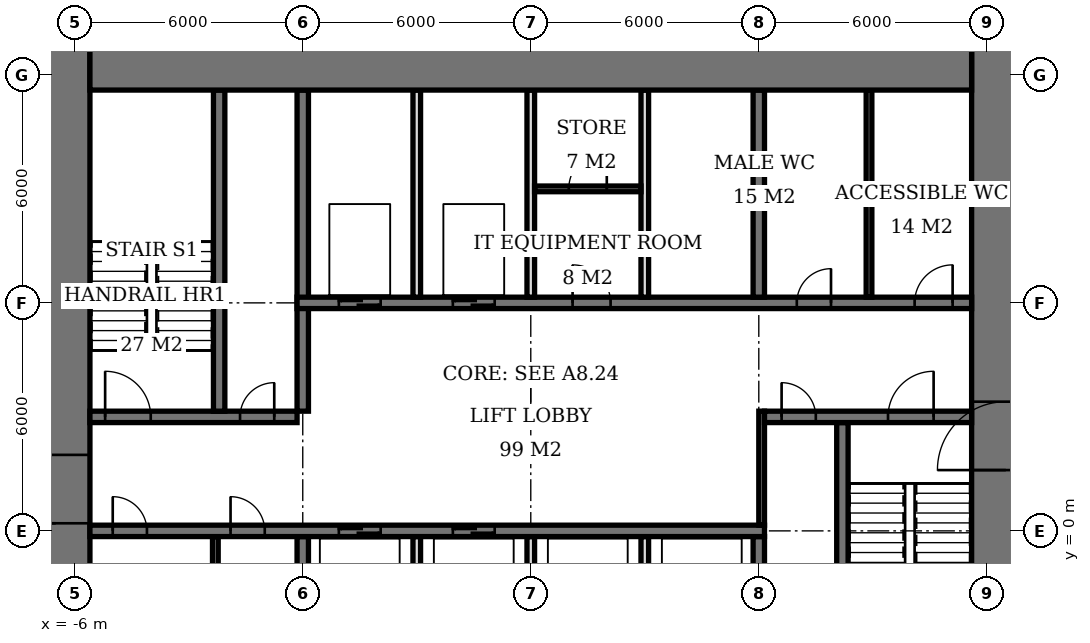
"""IFC4 building model, lengths in metres.
Left out: names, types, materials, properties, quantities, classifications, styles, units other than length and angle.
Written with IfcOpenShell. Run it as: python <this file> out.ifc"""

import sys

from ifc_helpers import new_model, si_unit, direction, frame, frame_2d, origin, place, context, subcontext, project, spatial, rectangle, extrude, element, fill, save


model = new_model("IFC4")
c1 = context("Model", 3, precision=1e-05, world=origin(), true_north=direction((0.0, 1.0)))
c2 = subcontext(c1, "Body", "Model", "MODEL_VIEW")
j1 = project(units=[si_unit("LENGTHUNIT", "METRE"), si_unit("PLANEANGLEUNIT", "RADIAN")], contexts=[c1])
p1 = place(None, origin())
s1 = spatial("IfcSite", under=j1, at=p1, CompositionType="ELEMENT")
p2 = place(p1, origin())
s2 = spatial("IfcBuilding", under=s1, at=p2, CompositionType="ELEMENT")
p3 = place(p2, frame((0.0, 0.0, 105.5)))
s3 = spatial("IfcBuildingStorey", under=s2, at=p3, CompositionType="ELEMENT", Elevation=105.5)
p4 = place(p3, frame((-5.6, 12.6, 0.0), z_axis=(0.0, 0.0, 1.0), x_axis=(1.0, 0.0, 0.0)))
e1 = element("IfcWall", 1, at=p4, inside=s3, PredefinedType="SHEAR", context=c2, shape_type="SweptSolid", body=[
    extrude(rectangle(XDim=23.2, YDim=2.0, at=frame_2d((11.6, 0.0))), origin(), (0.0, 0.0, 1.0), 3.9),
])
p5 = place(p3, frame((-6.5, -7.6, 0.0), z_axis=(0.0, 0.0, 1.0), x_axis=(0.0, 1.0, 0.0)))
e2 = element("IfcWall", 2, at=p5, inside=s3, PredefinedType="SHEAR", context=c2, shape_type="SweptSolid", body=[
    extrude(rectangle(XDim=21.2, YDim=1.8, at=frame_2d((10.6, 0.0))), origin(), (0.0, 0.0, 1.0), 3.9),
])
p6 = place(p5, frame((7.8, 0.0, 0.0)))
e3 = element("IfcOpeningElement", 3, at=p6, cuts=e2, PredefinedType="OPENING", context=c2, shape_type="SweptSolid", body=[
    extrude(rectangle(XDim=1.8, YDim=2.4, at=frame_2d((0.9, 1.2))), frame((0.0, 0.91, 0.0), z_axis=(0.0, -1.0, 0.0), x_axis=(1.0, 0.0, 0.0)), (0.0, 0.0, 1.0), 1.82),
])
p7 = place(p3, frame((18.5, -7.6, 0.0), z_axis=(0.0, 0.0, 1.0), x_axis=(0.0, 1.0, 0.0)))
e4 = element("IfcWall", 4, at=p7, inside=s3, PredefinedType="SHEAR", context=c2, shape_type="SweptSolid", body=[
    extrude(rectangle(XDim=21.2, YDim=1.8, at=frame_2d((10.6, 0.0))), origin(), (0.0, 0.0, 1.0), 3.9),
])
p8 = place(p7, frame((9.2, 0.0, 0.0)))
e5 = element("IfcOpeningElement", 5, at=p8, cuts=e4, PredefinedType="OPENING", context=c2, shape_type="SweptSolid", body=[
    extrude(rectangle(XDim=1.8, YDim=2.4, at=frame_2d((0.9, 1.2))), frame((0.0, 0.91, 0.0), z_axis=(0.0, -1.0, 0.0), x_axis=(1.0, 0.0, 0.0)), (0.0, 0.0, 1.0), 1.82),
])
p9 = place(p3, frame((-5.6, 0.0, 0.0), z_axis=(0.0, 0.0, 1.0), x_axis=(1.0, 0.0, 0.0)))
e6 = element("IfcWall", 6, at=p9, inside=s3, PredefinedType="SHEAR", context=c2, shape_type="SweptSolid", body=[
    extrude(rectangle(XDim=17.75, YDim=0.3, at=frame_2d((8.875, 0.0))), origin(), (0.0, 0.0, 1.0), 3.9),
])
p10 = place(p9, frame((0.6, 0.0, 0.0)))
e7 = element("IfcOpeningElement", 7, at=p10, cuts=e6, PredefinedType="OPENING", context=c2, shape_type="SweptSolid", body=[
    extrude(rectangle(XDim=0.9, YDim=2.1, at=frame_2d((0.45, 1.05))), frame((0.0, 0.16, 0.0), z_axis=(0.0, -1.0, 0.0), x_axis=(1.0, 0.0, 0.0)), (0.0, 0.0, 1.0), 0.32),
])
p11 = place(p9, frame((3.7, 0.0, 0.0)))
e8 = element("IfcOpeningElement", 8, at=p11, cuts=e6, PredefinedType="OPENING", context=c2, shape_type="SweptSolid", body=[
    extrude(rectangle(XDim=0.9, YDim=2.1, at=frame_2d((0.45, 1.05))), frame((0.0, 0.16, 0.0), z_axis=(0.0, -1.0, 0.0), x_axis=(1.0, 0.0, 0.0)), (0.0, 0.0, 1.0), 0.32),
])
p12 = place(p9, frame((6.55, 0.0, 0.0)))
e9 = element("IfcOpeningElement", 9, at=p12, cuts=e6, PredefinedType="OPENING", context=c2, shape_type="SweptSolid", body=[
    extrude(rectangle(XDim=1.1, YDim=2.1, at=frame_2d((0.55, 1.05))), frame((0.0, 0.16, 0.0), z_axis=(0.0, -1.0, 0.0), x_axis=(1.0, 0.0, 0.0)), (0.0, 0.0, 1.0), 0.32),
])
p13 = place(p9, frame((9.55, 0.0, 0.0)))
e10 = element("IfcOpeningElement", 10, at=p13, cuts=e6, PredefinedType="OPENING", context=c2, shape_type="SweptSolid", body=[
    extrude(rectangle(XDim=1.1, YDim=2.1, at=frame_2d((0.55, 1.05))), frame((0.0, 0.16, 0.0), z_axis=(0.0, -1.0, 0.0), x_axis=(1.0, 0.0, 0.0)), (0.0, 0.0, 1.0), 0.32),
])
p14 = place(p3, frame((-5.6, 3.0, 0.0), z_axis=(0.0, 0.0, 1.0), x_axis=(1.0, 0.0, 0.0)))
e11 = element("IfcWall", 11, at=p14, inside=s3, PredefinedType="SHEAR", context=c2, shape_type="SweptSolid", body=[
    extrude(rectangle(XDim=5.45, YDim=0.3, at=frame_2d((2.725, 0.0))), origin(), (0.0, 0.0, 1.0), 3.9),
])
p15 = place(p14, frame((0.4, 0.0, 0.0)))
e12 = element("IfcOpeningElement", 12, at=p15, cuts=e11, PredefinedType="OPENING", context=c2, shape_type="SweptSolid", body=[
    extrude(rectangle(XDim=1.2, YDim=2.1, at=frame_2d((0.6, 1.05))), frame((0.0, 0.16, 0.0), z_axis=(0.0, -1.0, 0.0), x_axis=(1.0, 0.0, 0.0)), (0.0, 0.0, 1.0), 0.32),
])
p16 = place(p14, frame((3.95, 0.0, 0.0)))
e13 = element("IfcOpeningElement", 13, at=p16, cuts=e11, PredefinedType="OPENING", context=c2, shape_type="SweptSolid", body=[
    extrude(rectangle(XDim=0.9, YDim=2.1, at=frame_2d((0.45, 1.05))), frame((0.0, 0.16, 0.0), z_axis=(0.0, -1.0, 0.0), x_axis=(1.0, 0.0, 0.0)), (0.0, 0.0, 1.0), 0.32),
])
p17 = place(p3, frame((12.15, 3.0, 0.0), z_axis=(0.0, 0.0, 1.0), x_axis=(1.0, 0.0, 0.0)))
e14 = element("IfcWall", 14, at=p17, inside=s3, PredefinedType="SHEAR", context=c2, shape_type="SweptSolid", body=[
    extrude(rectangle(XDim=5.45, YDim=0.3, at=frame_2d((2.725, 0.0))), origin(), (0.0, 0.0, 1.0), 3.9),
])
p18 = place(p17, frame((3.25, 0.0, 0.0)))
e15 = element("IfcOpeningElement", 15, at=p18, cuts=e14, PredefinedType="OPENING", context=c2, shape_type="SweptSolid", body=[
    extrude(rectangle(XDim=1.2, YDim=2.1, at=frame_2d((0.6, 1.05))), frame((0.0, 0.16, 0.0), z_axis=(0.0, -1.0, 0.0), x_axis=(1.0, 0.0, 0.0)), (0.0, 0.0, 1.0), 0.32),
])
p19 = place(p17, frame((0.45, 0.0, 0.0)))
e16 = element("IfcOpeningElement", 16, at=p19, cuts=e14, PredefinedType="OPENING", context=c2, shape_type="SweptSolid", body=[
    extrude(rectangle(XDim=0.9, YDim=2.1, at=frame_2d((0.45, 1.05))), frame((0.0, 0.16, 0.0), z_axis=(0.0, -1.0, 0.0), x_axis=(1.0, 0.0, 0.0)), (0.0, 0.0, 1.0), 0.32),
])
p20 = place(p3, frame((-0.15, 6.0, 0.0), z_axis=(0.0, 0.0, 1.0), x_axis=(1.0, 0.0, 0.0)))
e17 = element("IfcWall", 17, at=p20, inside=s3, PredefinedType="SHEAR", context=c2, shape_type="SweptSolid", body=[
    extrude(rectangle(XDim=17.75, YDim=0.3, at=frame_2d((8.875, 0.0))), origin(), (0.0, 0.0, 1.0), 3.9),
])
p21 = place(p20, frame((13.15, 0.0, 0.0)))
e18 = element("IfcOpeningElement", 18, at=p21, cuts=e17, PredefinedType="OPENING", context=c2, shape_type="SweptSolid", body=[
    extrude(rectangle(XDim=0.9, YDim=2.1, at=frame_2d((0.45, 1.05))), frame((0.0, 0.16, 0.0), z_axis=(0.0, -1.0, 0.0), x_axis=(1.0, 0.0, 0.0)), (0.0, 0.0, 1.0), 0.32),
])
p22 = place(p20, frame((16.25, 0.0, 0.0)))
e19 = element("IfcOpeningElement", 19, at=p22, cuts=e17, PredefinedType="OPENING", context=c2, shape_type="SweptSolid", body=[
    extrude(rectangle(XDim=1.0, YDim=2.1, at=frame_2d((0.5, 1.05))), frame((0.0, 0.16, 0.0), z_axis=(0.0, -1.0, 0.0), x_axis=(1.0, 0.0, 0.0)), (0.0, 0.0, 1.0), 0.32),
])
p23 = place(p20, frame((7.25, 0.0, 0.0)))
e20 = element("IfcOpeningElement", 20, at=p23, cuts=e17, PredefinedType="OPENING", context=c2, shape_type="SweptSolid", body=[
    extrude(rectangle(XDim=1.0, YDim=2.1, at=frame_2d((0.5, 1.05))), frame((0.0, 0.16, 0.0), z_axis=(0.0, -1.0, 0.0), x_axis=(1.0, 0.0, 0.0)), (0.0, 0.0, 1.0), 0.32),
])
p24 = place(p20, frame((1.1, 0.0, 0.0)))
e21 = element("IfcOpeningElement", 21, at=p24, cuts=e17, PredefinedType="OPENING", context=c2, shape_type="SweptSolid", body=[
    extrude(rectangle(XDim=1.1, YDim=2.1, at=frame_2d((0.55, 1.05))), frame((0.0, 0.16, 0.0), z_axis=(0.0, -1.0, 0.0), x_axis=(1.0, 0.0, 0.0)), (0.0, 0.0, 1.0), 0.32),
])
p25 = place(p20, frame((4.1, 0.0, 0.0)))
e22 = element("IfcOpeningElement", 22, at=p25, cuts=e17, PredefinedType="OPENING", context=c2, shape_type="SweptSolid", body=[
    extrude(rectangle(XDim=1.1, YDim=2.1, at=frame_2d((0.55, 1.05))), frame((0.0, 0.16, 0.0), z_axis=(0.0, -1.0, 0.0), x_axis=(1.0, 0.0, 0.0)), (0.0, 0.0, 1.0), 0.32),
])
p26 = place(p3, frame((0.0, -5.6, 0.0), z_axis=(0.0, 0.0, 1.0), x_axis=(0.0, 1.0, 0.0)))
e23 = element("IfcWall", 23, at=p26, inside=s3, PredefinedType="SHEAR", context=c2, shape_type="SweptSolid", body=[
    extrude(rectangle(XDim=5.45, YDim=0.3, at=frame_2d((2.725, 0.0))), origin(), (0.0, 0.0, 1.0), 3.9),
])
p27 = place(p3, frame((0.0, 3.15, 0.0), z_axis=(0.0, 0.0, 1.0), x_axis=(0.0, 1.0, 0.0)))
e24 = element("IfcWall", 24, at=p27, inside=s3, PredefinedType="SHEAR", context=c2, shape_type="SweptSolid", body=[
    extrude(rectangle(XDim=8.45, YDim=0.3, at=frame_2d((4.225, 0.0))), origin(), (0.0, 0.0, 1.0), 3.9),
])
for number, where, z_axis, x_axis in (
    (25, (12.0, -5.6, 0.0), (0.0, 0.0, 1.0), (0.0, 1.0, 0.0)),
    (26, (12.0, 6.15, 0.0), (0.0, 0.0, 1.0), (0.0, 1.0, 0.0)),
):
    element("IfcWall", number, at=place(p3, frame(where, z_axis=z_axis, x_axis=x_axis)), inside=s3, PredefinedType="SHEAR", context=c2, shape_type="SweptSolid", body=[
        extrude(rectangle(XDim=5.45, YDim=0.3, at=frame_2d((2.725, 0.0))), origin(), (0.0, 0.0, 1.0), 3.9),
    ])
for number, where, z_axis, x_axis in (
    (27, (-2.2, 3.15, 0.0), (0.0, 0.0, 1.0), (0.0, 1.0, 0.0)),
    (28, (14.2, -5.6, 0.0), (0.0, 0.0, 1.0), (0.0, 1.0, 0.0)),
):
    element("IfcWall", number, at=place(p3, frame(where, z_axis=z_axis, x_axis=x_axis)), inside=s3, PredefinedType="SHEAR", context=c2, shape_type="SweptSolid", body=[
        extrude(rectangle(XDim=8.45, YDim=0.3, at=frame_2d((4.225, 0.0))), origin(), (0.0, 0.0, 1.0), 3.9),
    ])
for number, where, z_axis, x_axis in (
    (29, (3.0, 6.15, 0.0), (0.0, 0.0, 1.0), (0.0, 1.0, 0.0)),
    (30, (6.0, 6.15, 0.0), (0.0, 0.0, 1.0), (0.0, 1.0, 0.0)),
    (31, (9.0, 6.15, 0.0), (0.0, 0.0, 1.0), (0.0, 1.0, 0.0)),
    (32, (3.0, -5.6, 0.0), (0.0, 0.0, 1.0), (0.0, 1.0, 0.0)),
    (33, (6.0, -5.6, 0.0), (0.0, 0.0, 1.0), (0.0, 1.0, 0.0)),
    (34, (9.0, -5.6, 0.0), (0.0, 0.0, 1.0), (0.0, 1.0, 0.0)),
):
    element("IfcWall", number, at=place(p3, frame(where, z_axis=z_axis, x_axis=x_axis)), inside=s3, PredefinedType="SOLIDWALL", context=c2, shape_type="SweptSolid", body=[
        extrude(rectangle(XDim=5.45, YDim=0.2, at=frame_2d((2.725, 0.0))), origin(), (0.0, 0.0, 1.0), 3.9),
    ])
for number, where, z_axis, x_axis in (
    (35, (-2.3, -5.6, 0.0), (0.0, 0.0, 1.0), (0.0, 1.0, 0.0)),
    (36, (14.9, 6.15, 0.0), (0.0, 0.0, 1.0), (0.0, 1.0, 0.0)),
):
    element("IfcWall", number, at=place(p3, frame(where, z_axis=z_axis, x_axis=x_axis)), inside=s3, PredefinedType="PLUMBINGWALL", context=c2, shape_type="SweptSolid", body=[
        extrude(rectangle(XDim=5.45, YDim=0.15, at=frame_2d((2.725, 0.0))), origin(), (0.0, 0.0, 1.0), 3.65),
    ])
p28 = place(p3, frame((6.1, 9.0, 0.0), z_axis=(0.0, 0.0, 1.0), x_axis=(1.0, 0.0, 0.0)))
e37 = element("IfcWall", 37, at=p28, inside=s3, PredefinedType="PARTITIONING", context=c2, shape_type="SweptSolid", body=[
    extrude(rectangle(XDim=2.8, YDim=0.15, at=frame_2d((1.4, 0.0))), origin(), (0.0, 0.0, 1.0), 3.65),
])
p29 = place(p28, frame((0.9, 0.0, 0.0)))
e38 = element("IfcOpeningElement", 38, at=p29, cuts=e37, PredefinedType="OPENING", context=c2, shape_type="SweptSolid", body=[
    extrude(rectangle(XDim=1.0, YDim=2.1, at=frame_2d((0.5, 1.05))), frame((0.0, 0.085, 0.0), z_axis=(0.0, -1.0, 0.0), x_axis=(1.0, 0.0, 0.0)), (0.0, 0.0, 1.0), 0.17),
])
p30 = place(p3, frame((12.075, 0.15, 0.0), z_axis=(0.0, 0.0, 1.0), x_axis=(0.0, 1.0, 0.0)))
e39 = element("IfcWall", 39, at=p30, inside=s3, PredefinedType="PARTITIONING", context=c2, shape_type="SweptSolid", body=[
    extrude(rectangle(XDim=3.0, YDim=0.15, at=frame_2d((1.5, 0.0))), origin(), (0.0, 0.0, 1.0), 3.65),
])
p31 = place(p6, origin())
e40 = element("IfcDoor", 40, at=p31, inside=s3, OperationType="DOUBLE_DOOR_SINGLE_SWING", PredefinedType="DOOR", context=c2, shape_type="SweptSolid", body=[
    extrude(rectangle(XDim=1.8, YDim=2.4, at=frame_2d((0.9, 1.2))), frame((0.0, 0.025, 0.0), z_axis=(0.0, -1.0, 0.0), x_axis=(1.0, 0.0, 0.0)), (0.0, 0.0, 1.0), 0.05),
])
fill(e3, e40)
p32 = place(p8, origin())
e41 = element("IfcDoor", 41, at=p32, inside=s3, OperationType="DOUBLE_DOOR_SINGLE_SWING", PredefinedType="DOOR", context=c2, shape_type="SweptSolid", body=[
    extrude(rectangle(XDim=1.8, YDim=2.4, at=frame_2d((0.9, 1.2))), frame((0.0, 0.025, 0.0), z_axis=(0.0, -1.0, 0.0), x_axis=(1.0, 0.0, 0.0)), (0.0, 0.0, 1.0), 0.05),
])
fill(e5, e41)
p33 = place(p15, origin())
e42 = element("IfcDoor", 42, at=p33, inside=s3, OperationType="SINGLE_SWING_LEFT", PredefinedType="DOOR", context=c2, shape_type="SweptSolid", body=[
    extrude(rectangle(XDim=1.2, YDim=2.1, at=frame_2d((0.6, 1.05))), frame((0.0, 0.025, 0.0), z_axis=(0.0, -1.0, 0.0), x_axis=(1.0, 0.0, 0.0)), (0.0, 0.0, 1.0), 0.05),
])
fill(e12, e42)
p34 = place(p16, origin())
e43 = element("IfcDoor", 43, at=p34, inside=s3, OperationType="SINGLE_SWING_RIGHT", PredefinedType="DOOR", context=c2, shape_type="SweptSolid", body=[
    extrude(rectangle(XDim=0.9, YDim=2.1, at=frame_2d((0.45, 1.05))), frame((0.0, 0.025, 0.0), z_axis=(0.0, -1.0, 0.0), x_axis=(1.0, 0.0, 0.0)), (0.0, 0.0, 1.0), 0.05),
])
fill(e13, e43)
p35 = place(p18, origin())
e44 = element("IfcDoor", 44, at=p35, inside=s3, OperationType="SINGLE_SWING_RIGHT", PredefinedType="DOOR", context=c2, shape_type="SweptSolid", body=[
    extrude(rectangle(XDim=1.2, YDim=2.1, at=frame_2d((0.6, 1.05))), frame((0.0, 0.025, 0.0), z_axis=(0.0, -1.0, 0.0), x_axis=(1.0, 0.0, 0.0)), (0.0, 0.0, 1.0), 0.05),
])
fill(e15, e44)
p36 = place(p19, origin())
e45 = element("IfcDoor", 45, at=p36, inside=s3, OperationType="SINGLE_SWING_LEFT", PredefinedType="DOOR", context=c2, shape_type="SweptSolid", body=[
    extrude(rectangle(XDim=0.9, YDim=2.1, at=frame_2d((0.45, 1.05))), frame((0.0, 0.025, 0.0), z_axis=(0.0, -1.0, 0.0), x_axis=(1.0, 0.0, 0.0)), (0.0, 0.0, 1.0), 0.05),
])
fill(e16, e45)
p37 = place(p10, origin())
e46 = element("IfcDoor", 46, at=p37, inside=s3, OperationType="SINGLE_SWING_LEFT", PredefinedType="DOOR", context=c2, shape_type="SweptSolid", body=[
    extrude(rectangle(XDim=0.9, YDim=2.1, at=frame_2d((0.45, 1.05))), frame((0.0, 0.025, 0.0), z_axis=(0.0, -1.0, 0.0), x_axis=(1.0, 0.0, 0.0)), (0.0, 0.0, 1.0), 0.05),
])
fill(e7, e46)
p38 = place(p11, origin())
e47 = element("IfcDoor", 47, at=p38, inside=s3, OperationType="SINGLE_SWING_LEFT", PredefinedType="DOOR", context=c2, shape_type="SweptSolid", body=[
    extrude(rectangle(XDim=0.9, YDim=2.1, at=frame_2d((0.45, 1.05))), frame((0.0, 0.025, 0.0), z_axis=(0.0, -1.0, 0.0), x_axis=(1.0, 0.0, 0.0)), (0.0, 0.0, 1.0), 0.05),
])
fill(e8, e47)
p39 = place(p21, origin())
e48 = element("IfcDoor", 48, at=p39, inside=s3, OperationType="SINGLE_SWING_RIGHT", PredefinedType="DOOR", context=c2, shape_type="SweptSolid", body=[
    extrude(rectangle(XDim=0.9, YDim=2.1, at=frame_2d((0.45, 1.05))), frame((0.0, 0.025, 0.0), z_axis=(0.0, -1.0, 0.0), x_axis=(1.0, 0.0, 0.0)), (0.0, 0.0, 1.0), 0.05),
])
fill(e18, e48)
p40 = place(p22, origin())
e49 = element("IfcDoor", 49, at=p40, inside=s3, OperationType="SINGLE_SWING_RIGHT", PredefinedType="DOOR", context=c2, shape_type="SweptSolid", body=[
    extrude(rectangle(XDim=1.0, YDim=2.1, at=frame_2d((0.5, 1.05))), frame((0.0, 0.025, 0.0), z_axis=(0.0, -1.0, 0.0), x_axis=(1.0, 0.0, 0.0)), (0.0, 0.0, 1.0), 0.05),
])
fill(e19, e49)
p41 = place(p29, origin())
e50 = element("IfcDoor", 50, at=p41, inside=s3, OperationType="SINGLE_SWING_RIGHT", PredefinedType="DOOR", context=c2, shape_type="SweptSolid", body=[
    extrude(rectangle(XDim=1.0, YDim=2.1, at=frame_2d((0.5, 1.05))), frame((0.0, 0.025, 0.0), z_axis=(0.0, -1.0, 0.0), x_axis=(1.0, 0.0, 0.0)), (0.0, 0.0, 1.0), 0.05),
])
fill(e38, e50)
p42 = place(p23, origin())
e51 = element("IfcDoor", 51, at=p42, inside=s3, OperationType="SINGLE_SWING_LEFT", PredefinedType="DOOR", context=c2, shape_type="SweptSolid", body=[
    extrude(rectangle(XDim=1.0, YDim=2.1, at=frame_2d((0.5, 1.05))), frame((0.0, 0.025, 0.0), z_axis=(0.0, -1.0, 0.0), x_axis=(1.0, 0.0, 0.0)), (0.0, 0.0, 1.0), 0.05),
])
fill(e20, e51)
p43 = place(p24, origin())
e52 = element("IfcDoor", 52, at=p43, inside=s3, OperationType="DOUBLE_DOOR_SLIDING", PredefinedType="USERDEFINED", context=c2, shape_type="SweptSolid", body=[
    extrude(rectangle(XDim=1.1, YDim=2.1, at=frame_2d((0.55, 1.05))), frame((0.0, 0.025, 0.0), z_axis=(0.0, -1.0, 0.0), x_axis=(1.0, 0.0, 0.0)), (0.0, 0.0, 1.0), 0.05),
])
fill(e21, e52)
p44 = place(p25, origin())
e53 = element("IfcDoor", 53, at=p44, inside=s3, OperationType="DOUBLE_DOOR_SLIDING", PredefinedType="USERDEFINED", context=c2, shape_type="SweptSolid", body=[
    extrude(rectangle(XDim=1.1, YDim=2.1, at=frame_2d((0.55, 1.05))), frame((0.0, 0.025, 0.0), z_axis=(0.0, -1.0, 0.0), x_axis=(1.0, 0.0, 0.0)), (0.0, 0.0, 1.0), 0.05),
])
fill(e22, e53)
p45 = place(p12, origin())
e54 = element("IfcDoor", 54, at=p45, inside=s3, OperationType="DOUBLE_DOOR_SLIDING", PredefinedType="USERDEFINED", context=c2, shape_type="SweptSolid", body=[
    extrude(rectangle(XDim=1.1, YDim=2.1, at=frame_2d((0.55, 1.05))), frame((0.0, 0.025, 0.0), z_axis=(0.0, -1.0, 0.0), x_axis=(1.0, 0.0, 0.0)), (0.0, 0.0, 1.0), 0.05),
])
fill(e9, e54)
p46 = place(p13, origin())
e55 = element("IfcDoor", 55, at=p46, inside=s3, OperationType="DOUBLE_DOOR_SLIDING", PredefinedType="USERDEFINED", context=c2, shape_type="SweptSolid", body=[
    extrude(rectangle(XDim=1.1, YDim=2.1, at=frame_2d((0.55, 1.05))), frame((0.0, 0.025, 0.0), z_axis=(0.0, -1.0, 0.0), x_axis=(1.0, 0.0, 0.0)), (0.0, 0.0, 1.0), 0.05),
])
fill(e10, e55)
save(model, sys.argv[1])
